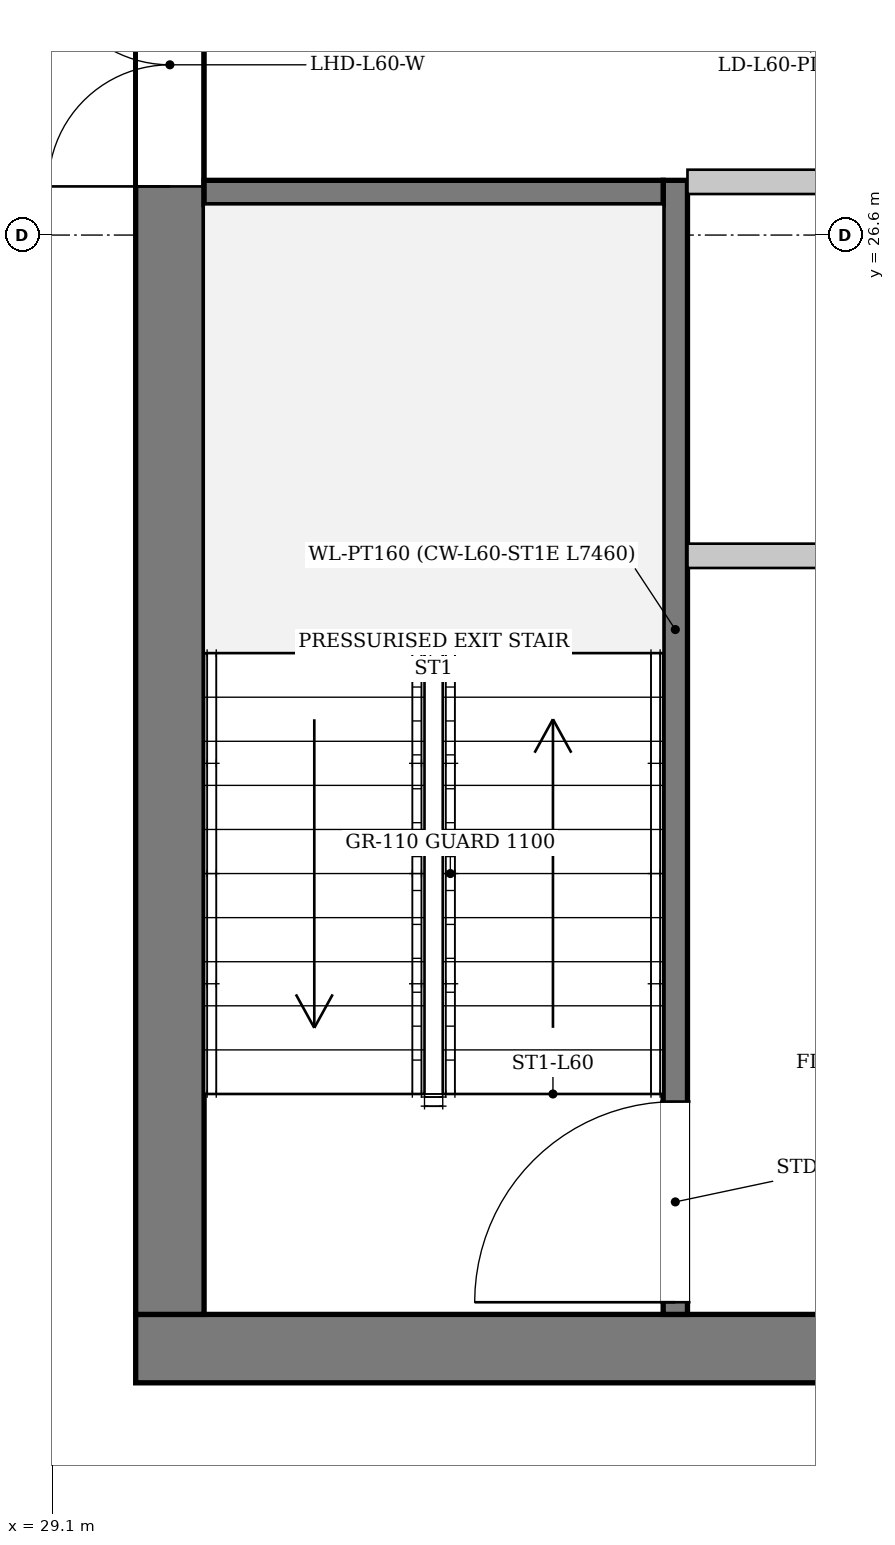
"""IFC4 building model, lengths in metres.
Left out: names, types, materials, properties, quantities, classifications, styles, units other than length and angle.
Written with IfcOpenShell. Run it as: python <this file> out.ifc"""

import sys

from ifc_helpers import new_model, si_unit, direction, frame, frame_2d, origin, place, context, subcontext, project, spatial, rectangle, extrude, source, transform, mapped, element, fill, save


model = new_model("IFC4")
c1 = context("Model", 3, precision=1e-05, world=origin(), true_north=direction((0.0, 1.0)))
c2 = subcontext(c1, "Body", "Model", "MODEL_VIEW")
j1 = project(units=[si_unit("LENGTHUNIT", "METRE"), si_unit("PLANEANGLEUNIT", "RADIAN")], contexts=[c1])
p1 = place(None, origin())
s1 = spatial("IfcSite", under=j1, at=p1, CompositionType="ELEMENT")
p2 = place(p1, origin())
s2 = spatial("IfcBuilding", under=s1, at=p2, CompositionType="ELEMENT")
p3 = place(p2, frame((0.0, 0.0, 227.35)))
s3 = spatial("IfcBuildingStorey", under=s2, at=p3, CompositionType="ELEMENT", Elevation=227.35)
p4 = place(p3, frame((46.35, 19.275, 0.0), z_axis=(0.0, 0.0, 1.0), x_axis=(-1.0, 0.0, 0.0)))
e1 = element("IfcWall", 1, at=p4, inside=s3, PredefinedType="SHEAR", context=c2, shape_type="SweptSolid", body=[
    extrude(rectangle(XDim=16.7, YDim=0.45, at=frame_2d((8.35, 0.0))), origin(), (0.0, 0.0, 1.0), 3.33),
])
p5 = place(p4, frame((4.55, 0.0, 0.0)))
e2 = element("IfcOpeningElement", 2, at=p5, cuts=e1, PredefinedType="OPENING", context=c2, shape_type="SweptSolid", body=[
    extrude(rectangle(XDim=1.12, YDim=2.25, at=frame_2d((0.56, 1.125))), frame((0.0, 0.235, 0.0), z_axis=(0.0, -1.0, 0.0), x_axis=(1.0, 0.0, 0.0)), (0.0, 0.0, 1.0), 0.47),
])
p6 = place(p4, frame((11.05, 0.0, 0.0)))
e3 = element("IfcOpeningElement", 3, at=p6, cuts=e1, PredefinedType="OPENING", context=c2, shape_type="SweptSolid", body=[
    extrude(rectangle(XDim=1.12, YDim=2.25, at=frame_2d((0.56, 1.125))), frame((0.0, 0.235, 0.0), z_axis=(0.0, -1.0, 0.0), x_axis=(1.0, 0.0, 0.0)), (0.0, 0.0, 1.0), 0.47),
])
p7 = place(p3, frame((29.875, 19.5, 0.0), z_axis=(0.0, 0.0, 1.0), x_axis=(0.0, 1.0, 0.0)))
e4 = element("IfcWall", 4, at=p7, inside=s3, PredefinedType="SHEAR", context=c2, shape_type="SweptSolid", body=[
    extrude(rectangle(XDim=14.2, YDim=0.45, at=frame_2d((7.1, 0.0))), origin(), (0.0, 0.0, 1.0), 3.33),
])
p8 = place(p7, frame((7.42, 0.0, 0.0)))
e5 = element("IfcOpeningElement", 5, at=p8, cuts=e4, PredefinedType="OPENING", context=c2, shape_type="SweptSolid", body=[
    extrude(rectangle(XDim=1.6, YDim=2.2, at=frame_2d((0.8, 1.1))), frame((0.0, 0.235, 0.0), z_axis=(0.0, -1.0, 0.0), x_axis=(1.0, 0.0, 0.0)), (0.0, 0.0, 1.0), 0.47),
])
p9 = place(p3, frame((33.2, 19.5, 0.0), z_axis=(0.0, 0.0, 1.0), x_axis=(0.0, 1.0, 0.0)))
e6 = element("IfcWall", 6, at=p9, inside=s3, PredefinedType="PARTITIONING", context=c2, shape_type="SweptSolid", body=[
    extrude(rectangle(XDim=7.46, YDim=0.16, at=frame_2d((3.73, 0.0))), origin(), (0.0, 0.0, 1.0), 3.33),
])
p10 = place(p9, frame((0.08, 0.0, 0.0)))
e7 = element("IfcOpeningElement", 7, at=p10, cuts=e6, PredefinedType="OPENING", context=c2, shape_type="SweptSolid", body=[
    extrude(rectangle(XDim=1.32, YDim=2.2, at=frame_2d((0.66, 1.1))), frame((0.0, 0.09, 0.0), z_axis=(0.0, -1.0, 0.0), x_axis=(1.0, 0.0, 0.0)), (0.0, 0.0, 1.0), 0.18),
])
p11 = place(p3, frame((30.1, 26.88, 0.0), z_axis=(0.0, 0.0, 1.0), x_axis=(1.0, 0.0, 0.0)))
e8 = element("IfcWall", 8, at=p11, inside=s3, PredefinedType="PARTITIONING", context=c2, shape_type="SweptSolid", body=[
    extrude(rectangle(XDim=3.02, YDim=0.16, at=frame_2d((1.51, 0.0))), origin(), (0.0, 0.0, 1.0), 3.33),
])
p12 = place(p3, frame((33.28, 24.49, 0.0), z_axis=(0.0, 0.0, 1.0), x_axis=(1.0, 0.0, 0.0)))
e9 = element("IfcWall", 9, at=p12, inside=s3, PredefinedType="PARTITIONING", context=c2, shape_type="SweptSolid", body=[
    extrude(rectangle(XDim=9.44, YDim=0.16, at=frame_2d((4.72, 0.0))), origin(), (0.0, 0.0, 1.0), 3.33),
])
p13 = place(p3, frame((33.28, 26.95, 0.0), z_axis=(0.0, 0.0, 1.0), x_axis=(1.0, 0.0, 0.0)))
e10 = element("IfcWall", 10, at=p13, inside=s3, PredefinedType="PARTITIONING", context=c2, shape_type="SweptSolid", body=[
    extrude(rectangle(XDim=9.44, YDim=0.16, at=frame_2d((4.72, 0.0))), origin(), (0.0, 0.0, 1.0), 3.33),
])
p14 = place(p13, frame((1.2, 0.0, 0.0)))
e11 = element("IfcOpeningElement", 11, at=p14, cuts=e10, PredefinedType="OPENING", context=c2, shape_type="SweptSolid", body=[
    extrude(rectangle(XDim=0.95, YDim=2.1, at=frame_2d((0.475, 1.05))), frame((0.0, 0.09, 0.0), z_axis=(0.0, -1.0, 0.0), x_axis=(1.0, 0.0, 0.0)), (0.0, 0.0, 1.0), 0.18),
])
p15 = place(p13, frame((4.65, 0.0, 0.0)))
e12 = element("IfcOpeningElement", 12, at=p15, cuts=e10, PredefinedType="OPENING", context=c2, shape_type="SweptSolid", body=[
    extrude(rectangle(XDim=0.95, YDim=2.1, at=frame_2d((0.475, 1.05))), frame((0.0, 0.09, 0.0), z_axis=(0.0, -1.0, 0.0), x_axis=(1.0, 0.0, 0.0)), (0.0, 0.0, 1.0), 0.18),
])
p16 = place(p13, frame((7.67, 0.0, 0.0)))
e13 = element("IfcOpeningElement", 13, at=p16, cuts=e10, PredefinedType="OPENING", context=c2, shape_type="SweptSolid", body=[
    extrude(rectangle(XDim=1.1, YDim=2.2, at=frame_2d((0.55, 1.1))), frame((0.0, 0.09, 0.0), z_axis=(0.0, -1.0, 0.0), x_axis=(1.0, 0.0, 0.0)), (0.0, 0.0, 1.0), 0.18),
])
m1 = source(origin(), c2, "Body", "SweptSolid", [
    extrude(rectangle(XDim=1.6, YDim=2.2, at=frame_2d((0.8, 1.1))), frame((0.0, 0.025, 0.0), z_axis=(0.0, -1.0, 0.0), x_axis=(1.0, 0.0, 0.0)), (0.0, 0.0, 1.0), 0.05),
])
p17 = place(p8, origin())
e14 = element("IfcDoor", 14, at=p17, inside=s3, OperationType="DOUBLE_DOOR_SINGLE_SWING", PredefinedType="DOOR", context=c2, shape_type="MappedRepresentation", body=[
    mapped(m1, transform((0.0, 0.0, 0.0), x_axis=(1.0, 0.0, 0.0), y_axis=(0.0, 1.0, 0.0), z_axis=(0.0, 0.0, 1.0), scale=1.0)),
])
fill(e5, e14)
m2 = source(origin(), c2, "Body", "SweptSolid", [
    extrude(rectangle(XDim=1.32, YDim=2.2, at=frame_2d((0.66, 1.1))), frame((0.0, 0.025, 0.0), z_axis=(0.0, -1.0, 0.0), x_axis=(1.0, 0.0, 0.0)), (0.0, 0.0, 1.0), 0.05),
])
p18 = place(p10, origin())
e15 = element("IfcDoor", 15, at=p18, inside=s3, OperationType="SINGLE_SWING_LEFT", PredefinedType="DOOR", context=c2, shape_type="MappedRepresentation", body=[
    mapped(m2, transform((0.0, 0.0, 0.0), x_axis=(1.0, 0.0, 0.0), y_axis=(0.0, 1.0, 0.0), z_axis=(0.0, 0.0, 1.0), scale=1.0)),
])
fill(e7, e15)
save(model, sys.argv[1])
